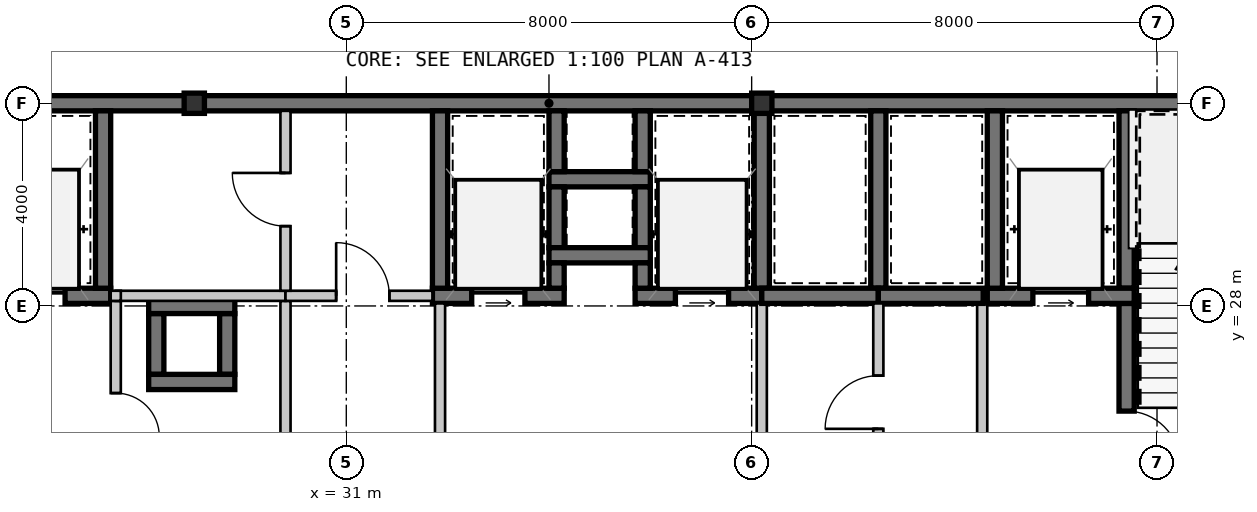
"""IFC4 building model, lengths in metres.
Left out: names, types, materials, properties, quantities, classifications, styles, units other than length and angle.
Written with IfcOpenShell. Run it as: python <this file> out.ifc"""

import sys

from ifc_helpers import new_model, si_unit, direction, frame, frame_2d, origin, origin_2d, place, context, subcontext, project, spatial, rectangle, hollow_rectangle, extrude, source, transform, mapped, element, fill, save


model = new_model("IFC4")
c1 = context("Model", 3, precision=1e-05, world=origin(), true_north=direction((0.0, 1.0)))
c2 = subcontext(c1, "Body", "Model", "MODEL_VIEW")
j1 = project(units=[si_unit("LENGTHUNIT", "METRE"), si_unit("PLANEANGLEUNIT", "RADIAN")], contexts=[c1])
p1 = place(None, origin())
s1 = spatial("IfcSite", under=j1, at=p1, CompositionType="ELEMENT")
p2 = place(p1, origin())
s2 = spatial("IfcBuilding", under=s1, at=p2, CompositionType="ELEMENT")
p3 = place(p2, frame((0.0, 0.0, 158.2)))
s3 = spatial("IfcBuildingStorey", under=s2, at=p3, CompositionType="ELEMENT", Elevation=158.2)
m1 = source(origin(), c2, "Body", "SweptSolid", [
    extrude(hollow_rectangle(XDim=0.4, YDim=0.4, WallThickness=0.016, at=origin_2d()), origin(), (0.0, 0.0, 1.0), 3.15),
])
for number, where, z_axis, x_axis in (
    (1, (28.0, 32.0, 0.0), (0.0, 0.0, 1.0), (1.0, 0.0, 0.0)),
    (2, (39.2, 32.0, 0.0), (0.0, 0.0, 1.0), (1.0, 0.0, 0.0)),
):
    element("IfcColumn", number, at=place(p3, frame(where, z_axis=z_axis, x_axis=x_axis)), inside=s3, PredefinedType="COLUMN", context=c2, shape_type="MappedRepresentation", body=[
        mapped(m1, transform((0.0, 0.0, 0.0), scale=1.0)),
    ])
m2 = source(origin(), c2, "Body", "SweptSolid", [
    extrude(rectangle(XDim=9.15, YDim=0.3, at=frame_2d((4.575, 0.0))), origin(), (0.0, 0.0, 1.0), 2.93),
])
p4 = place(p3, frame((18.85, 32.0, 0.0), z_axis=(0.0, 0.0, 1.0), x_axis=(1.0, 0.0, 0.0)))
e3 = element("IfcWall", 3, at=p4, inside=s3, PredefinedType="SHEAR", context=c2, shape_type="MappedRepresentation", body=[
    mapped(m2, transform((0.0, 0.0, 0.0), scale=1.0)),
])
m3 = source(origin(), c2, "Body", "SweptSolid", [
    extrude(rectangle(XDim=11.2, YDim=0.3, at=frame_2d((5.6, 0.0))), origin(), (0.0, 0.0, 1.0), 2.93),
])
p5 = place(p3, frame((28.0, 32.0, 0.0), z_axis=(0.0, 0.0, 1.0), x_axis=(1.0, 0.0, 0.0)))
e4 = element("IfcWall", 4, at=p5, inside=s3, PredefinedType="SHEAR", context=c2, shape_type="MappedRepresentation", body=[
    mapped(m3, transform((0.0, 0.0, 0.0), scale=1.0)),
])
m4 = source(origin(), c2, "Body", "SweptSolid", [
    extrude(rectangle(XDim=11.95, YDim=0.3, at=frame_2d((5.975, 0.0))), origin(), (0.0, 0.0, 1.0), 2.93),
])
p6 = place(p3, frame((39.2, 32.0, 0.0), z_axis=(0.0, 0.0, 1.0), x_axis=(1.0, 0.0, 0.0)))
e5 = element("IfcWall", 5, at=p6, inside=s3, PredefinedType="SHEAR", context=c2, shape_type="MappedRepresentation", body=[
    mapped(m4, transform((0.0, 0.0, 0.0), scale=1.0)),
])
m5 = source(origin(), c2, "Body", "SweptSolid", [
    extrude(rectangle(XDim=2.9, YDim=0.3, at=frame_2d((1.45, 0.0))), origin(), (0.0, 0.0, 1.0), 2.93),
])
p7 = place(p3, frame((23.45, 28.2, 0.0), z_axis=(0.0, 0.0, 1.0), x_axis=(1.0, 0.0, 0.0)))
e6 = element("IfcWall", 6, at=p7, inside=s3, PredefinedType="SHEAR", context=c2, shape_type="MappedRepresentation", body=[
    mapped(m5, transform((0.0, 0.0, 0.0), scale=1.0)),
])
m6 = source(origin(), c2, "Body", "SweptSolid", [
    extrude(rectangle(XDim=1.1, YDim=2.15, at=frame_2d((0.55, 1.075))), frame((0.0, 0.16, 0.0), z_axis=(0.0, -1.0, 0.0), x_axis=(1.0, 0.0, 0.0)), (0.0, 0.0, 1.0), 0.32),
])
p8 = place(p7, frame((0.9, 0.0, 0.0)))
e7 = element("IfcOpeningElement", 7, at=p8, cuts=e6, PredefinedType="OPENING", context=c2, shape_type="MappedRepresentation", body=[
    mapped(m6, transform((0.0, 0.0, 0.0), scale=1.0)),
])
m7 = source(origin(), c2, "Body", "SweptSolid", [
    extrude(rectangle(XDim=3.5, YDim=0.3, at=frame_2d((1.75, 0.0))), origin(), (0.0, 0.0, 1.0), 2.93),
])
p9 = place(p3, frame((26.2, 28.35, 0.0), z_axis=(0.0, 0.0, 1.0), x_axis=(0.0, 1.0, 0.0)))
e8 = element("IfcWall", 8, at=p9, inside=s3, PredefinedType="SHEAR", context=c2, shape_type="MappedRepresentation", body=[
    mapped(m7, transform((0.0, 0.0, 0.0), scale=1.0)),
])
m8 = source(origin(), c2, "Body", "SweptSolid", [
    extrude(rectangle(XDim=4.0, YDim=0.2, at=frame_2d((2.0, 0.0))), origin(), (0.0, 0.0, 1.0), 2.93),
])
p10 = place(p3, frame((26.45, 24.1, 0.0), z_axis=(0.0, 0.0, 1.0), x_axis=(0.0, 1.0, 0.0)))
e9 = element("IfcWall", 9, at=p10, inside=s3, PredefinedType="SOLIDWALL", context=c2, shape_type="MappedRepresentation", body=[
    mapped(m8, transform((0.0, 0.0, 0.0), scale=1.0)),
])
m9 = source(origin(), c2, "Body", "SweptSolid", [
    extrude(rectangle(XDim=0.86, YDim=2.1, at=frame_2d((0.43, 1.05))), frame((0.0, 0.11, 0.0), z_axis=(0.0, -1.0, 0.0), x_axis=(1.0, 0.0, 0.0)), (0.0, 0.0, 1.0), 0.22),
])
p11 = place(p10, frame((1.32, 0.0, 0.0)))
e10 = element("IfcOpeningElement", 10, at=p11, cuts=e9, PredefinedType="OPENING", context=c2, shape_type="MappedRepresentation", body=[
    mapped(m9, transform((0.0, 0.0, 0.0), scale=1.0)),
])
p12 = place(p3, frame((46.4, 31.85, 0.0), z_axis=(0.0, 0.0, 1.0), x_axis=(0.0, -1.0, 0.0)))
e11 = element("IfcWall", 11, at=p12, inside=s3, PredefinedType="SHEAR", context=c2, shape_type="MappedRepresentation", body=[
    mapped(m7, transform((0.0, 0.0, 0.0), scale=1.0)),
])
m10 = source(origin(), c2, "Body", "SweptSolid", [
    extrude(rectangle(XDim=3.9, YDim=0.3, at=frame_2d((1.95, 0.0))), origin(), (0.0, 0.0, 1.0), 2.93),
])
p13 = place(p3, frame((46.4, 28.05, 0.0), z_axis=(0.0, 0.0, 1.0), x_axis=(0.0, -1.0, 0.0)))
e12 = element("IfcWall", 12, at=p13, inside=s3, PredefinedType="SHEAR", context=c2, shape_type="MappedRepresentation", body=[
    mapped(m10, transform((0.0, 0.0, 0.0), scale=1.0)),
])
m11 = source(origin(), c2, "Body", "SweptSolid", [
    extrude(rectangle(XDim=1.05, YDim=2.1, at=frame_2d((0.525, 1.05))), frame((0.0, 0.16, 0.0), z_axis=(0.0, -1.0, 0.0), x_axis=(1.0, 0.0, 0.0)), (0.0, 0.0, 1.0), 0.32),
])
p14 = place(p13, frame((2.125, 0.0, 0.0)))
e13 = element("IfcOpeningElement", 13, at=p14, cuts=e12, PredefinedType="OPENING", context=c2, shape_type="MappedRepresentation", body=[
    mapped(m11, transform((0.0, 0.0, 0.0), scale=1.0)),
])
p15 = place(p3, frame((43.65, 28.2, 0.0), z_axis=(0.0, 0.0, 1.0), x_axis=(1.0, 0.0, 0.0)))
e14 = element("IfcWall", 14, at=p15, inside=s3, PredefinedType="SHEAR", context=c2, shape_type="MappedRepresentation", body=[
    mapped(m5, transform((0.0, 0.0, 0.0), scale=1.0)),
])
p16 = place(p15, frame((0.9, 0.0, 0.0)))
e15 = element("IfcOpeningElement", 15, at=p16, cuts=e14, PredefinedType="OPENING", context=c2, shape_type="MappedRepresentation", body=[
    mapped(m6, transform((0.0, 0.0, 0.0), scale=1.0)),
])
p17 = place(p3, frame((43.8, 31.85, 0.0), z_axis=(0.0, 0.0, 1.0), x_axis=(0.0, -1.0, 0.0)))
e16 = element("IfcWall", 16, at=p17, inside=s3, PredefinedType="SHEAR", context=c2, shape_type="MappedRepresentation", body=[
    mapped(m7, transform((0.0, 0.0, 0.0), scale=1.0)),
])
m12 = source(origin(), c2, "Body", "SweptSolid", [
    extrude(rectangle(XDim=3.95, YDim=0.2, at=frame_2d((1.975, 0.0))), origin(), (0.0, 0.0, 1.0), 2.93),
])
p18 = place(p3, frame((43.55, 28.05, 0.0), z_axis=(0.0, 0.0, 1.0), x_axis=(0.0, -1.0, 0.0)))
e17 = element("IfcWall", 17, at=p18, inside=s3, PredefinedType="SOLIDWALL", context=c2, shape_type="MappedRepresentation", body=[
    mapped(m12, transform((0.0, 0.0, 0.0), scale=1.0)),
])
m13 = source(origin(), c2, "Body", "SweptSolid", [
    extrude(rectangle(XDim=2.0, YDim=0.3, at=frame_2d((1.0, 0.0))), origin(), (0.0, 0.0, 1.0), 2.93),
])
p19 = place(p3, frame((35.0, 30.5, 0.0), z_axis=(0.0, 0.0, 1.0), x_axis=(1.0, 0.0, 0.0)))
e18 = element("IfcWall", 18, at=p19, inside=s3, PredefinedType="SHEAR", context=c2, shape_type="MappedRepresentation", body=[
    mapped(m13, transform((0.0, 0.0, 0.0), scale=1.0)),
])
m14 = source(origin(), c2, "Body", "SweptSolid", [
    extrude(rectangle(XDim=1.2, YDim=0.3, at=frame_2d((0.6, 0.0))), origin(), (0.0, 0.0, 1.0), 2.93),
])
for number, where, z_axis, x_axis in (
    (19, (35.15, 31.85, 0.0), (0.0, 0.0, 1.0), (0.0, -1.0, 0.0)),
    (20, (36.85, 30.65, 0.0), (0.0, 0.0, 1.0), (0.0, 1.0, 0.0)),
    (21, (35.15, 30.35, 0.0), (0.0, 0.0, 1.0), (0.0, -1.0, 0.0)),
    (22, (36.85, 29.15, 0.0), (0.0, 0.0, 1.0), (0.0, 1.0, 0.0)),
):
    element("IfcWall", number, at=place(p3, frame(where, z_axis=z_axis, x_axis=x_axis)), inside=s3, PredefinedType="SHEAR", context=c2, shape_type="MappedRepresentation", body=[
        mapped(m14, transform((0.0, 0.0, 0.0), scale=1.0)),
    ])
p20 = place(p3, frame((35.0, 29.0, 0.0), z_axis=(0.0, 0.0, 1.0), x_axis=(1.0, 0.0, 0.0)))
e23 = element("IfcWall", 23, at=p20, inside=s3, PredefinedType="SHEAR", context=c2, shape_type="MappedRepresentation", body=[
    mapped(m13, transform((0.0, 0.0, 0.0), scale=1.0)),
])
for number, where, z_axis, x_axis in (
    (24, (28.65, 26.65, 0.0), (0.0, 0.0, 1.0), (0.0, 1.0, 0.0)),
    (25, (27.25, 27.85, 0.0), (0.0, 0.0, 1.0), (0.0, -1.0, 0.0)),
):
    element("IfcWall", number, at=place(p3, frame(where, z_axis=z_axis, x_axis=x_axis)), inside=s3, PredefinedType="SHEAR", context=c2, shape_type="MappedRepresentation", body=[
        mapped(m14, transform((0.0, 0.0, 0.0), scale=1.0)),
    ])
m15 = source(origin(), c2, "Body", "SweptSolid", [
    extrude(rectangle(XDim=1.7, YDim=0.3, at=frame_2d((0.85, 0.0))), origin(), (0.0, 0.0, 1.0), 2.93),
])
for number, where, z_axis, x_axis in (
    (26, (28.8, 28.0, 0.0), (0.0, 0.0, 1.0), (-1.0, 0.0, 0.0)),
    (27, (27.1, 26.5, 0.0), (0.0, 0.0, 1.0), (1.0, 0.0, 0.0)),
):
    element("IfcWall", number, at=place(p3, frame(where, z_axis=z_axis, x_axis=x_axis)), inside=s3, PredefinedType="SHEAR", context=c2, shape_type="MappedRepresentation", body=[
        mapped(m15, transform((0.0, 0.0, 0.0), scale=1.0)),
    ])
m16 = source(origin(), c2, "Body", "SweptSolid", [
    extrude(rectangle(XDim=2.6, YDim=0.3, at=frame_2d((1.3, 0.0))), origin(), (0.0, 0.0, 1.0), 2.93),
])
p21 = place(p3, frame((32.7, 28.2, 0.0), z_axis=(0.0, 0.0, 1.0), x_axis=(1.0, 0.0, 0.0)))
e28 = element("IfcWall", 28, at=p21, inside=s3, PredefinedType="SHEAR", context=c2, shape_type="MappedRepresentation", body=[
    mapped(m16, transform((0.0, 0.0, 0.0), scale=1.0)),
])
m17 = source(origin(), c2, "Body", "SweptSolid", [
    extrude(rectangle(XDim=1.05, YDim=2.15, at=frame_2d((0.525, 1.075))), frame((0.0, 0.16, 0.0), z_axis=(0.0, -1.0, 0.0), x_axis=(1.0, 0.0, 0.0)), (0.0, 0.0, 1.0), 0.32),
])
p22 = place(p21, frame((0.775, 0.0, 0.0)))
e29 = element("IfcOpeningElement", 29, at=p22, cuts=e28, PredefinedType="OPENING", context=c2, shape_type="MappedRepresentation", body=[
    mapped(m17, transform((0.0, 0.0, 0.0), scale=1.0)),
])
m18 = source(origin(), c2, "Body", "SweptSolid", [
    extrude(rectangle(XDim=0.5, YDim=0.3, at=frame_2d((0.25, 0.0))), origin(), (0.0, 0.0, 1.0), 2.93),
])
p23 = place(p3, frame((35.15, 28.35, 0.0), z_axis=(0.0, 0.0, 1.0), x_axis=(0.0, 1.0, 0.0)))
e30 = element("IfcWall", 30, at=p23, inside=s3, PredefinedType="SHEAR", context=c2, shape_type="MappedRepresentation", body=[
    mapped(m18, transform((0.0, 0.0, 0.0), scale=1.0)),
])
p24 = place(p3, frame((32.85, 31.85, 0.0), z_axis=(0.0, 0.0, 1.0), x_axis=(0.0, -1.0, 0.0)))
e31 = element("IfcWall", 31, at=p24, inside=s3, PredefinedType="SHEAR", context=c2, shape_type="MappedRepresentation", body=[
    mapped(m7, transform((0.0, 0.0, 0.0), scale=1.0)),
])
m19 = source(origin(), c2, "Body", "SweptSolid", [
    extrude(rectangle(XDim=2.5, YDim=0.3, at=frame_2d((1.25, 0.0))), origin(), (0.0, 0.0, 1.0), 2.93),
])
p25 = place(p3, frame((36.7, 28.2, 0.0), z_axis=(0.0, 0.0, 1.0), x_axis=(1.0, 0.0, 0.0)))
e32 = element("IfcWall", 32, at=p25, inside=s3, PredefinedType="SHEAR", context=c2, shape_type="MappedRepresentation", body=[
    mapped(m19, transform((0.0, 0.0, 0.0), scale=1.0)),
])
p26 = place(p25, frame((0.795, 0.0, 0.0)))
e33 = element("IfcOpeningElement", 33, at=p26, cuts=e32, PredefinedType="OPENING", context=c2, shape_type="MappedRepresentation", body=[
    mapped(m17, transform((0.0, 0.0, 0.0), scale=1.0)),
])
p27 = place(p3, frame((36.85, 28.85, 0.0), z_axis=(0.0, 0.0, 1.0), x_axis=(0.0, -1.0, 0.0)))
e34 = element("IfcWall", 34, at=p27, inside=s3, PredefinedType="SHEAR", context=c2, shape_type="MappedRepresentation", body=[
    mapped(m18, transform((0.0, 0.0, 0.0), scale=1.0)),
])
p28 = place(p3, frame((39.2, 28.35, 0.0), z_axis=(0.0, 0.0, 1.0), x_axis=(0.0, 1.0, 0.0)))
e35 = element("IfcWall", 35, at=p28, inside=s3, PredefinedType="SHEAR", context=c2, shape_type="MappedRepresentation", body=[
    mapped(m7, transform((0.0, 0.0, 0.0), scale=1.0)),
])
p29 = place(p3, frame((32.85, 24.1, 0.0), z_axis=(0.0, 0.0, 1.0), x_axis=(0.0, 1.0, 0.0)))
e36 = element("IfcWall", 36, at=p29, inside=s3, PredefinedType="SOLIDWALL", context=c2, shape_type="MappedRepresentation", body=[
    mapped(m12, transform((0.0, 0.0, 0.0), scale=1.0)),
])
m20 = source(origin(), c2, "Body", "SweptSolid", [
    extrude(rectangle(XDim=3.95, YDim=0.2, at=frame_2d((1.975, 0.0))), origin(), (0.0, 0.0, 1.0), 2.47),
])
p30 = place(p3, frame((39.2, 28.05, 0.0), z_axis=(0.0, 0.0, 1.0), x_axis=(0.0, -1.0, 0.0)))
e37 = element("IfcWall", 37, at=p30, inside=s3, PredefinedType="SOLIDWALL", context=c2, shape_type="MappedRepresentation", body=[
    mapped(m20, transform((0.0, 0.0, 0.0), scale=1.0)),
])
p31 = place(p3, frame((41.5, 28.35, 0.0), z_axis=(0.0, 0.0, 1.0), x_axis=(0.0, 1.0, 0.0)))
e38 = element("IfcWall", 38, at=p31, inside=s3, PredefinedType="SHEAR", context=c2, shape_type="MappedRepresentation", body=[
    mapped(m7, transform((0.0, 0.0, 0.0), scale=1.0)),
])
m21 = source(origin(), c2, "Body", "SweptSolid", [
    extrude(rectangle(XDim=2.3, YDim=0.3, at=frame_2d((1.15, 0.0))), origin(), (0.0, 0.0, 1.0), 2.93),
])
p32 = place(p3, frame((39.2, 28.2, 0.0), z_axis=(0.0, 0.0, 1.0), x_axis=(1.0, 0.0, 0.0)))
e39 = element("IfcWall", 39, at=p32, inside=s3, PredefinedType="SHEAR", context=c2, shape_type="MappedRepresentation", body=[
    mapped(m21, transform((0.0, 0.0, 0.0), scale=1.0)),
])
m22 = source(origin(), c2, "Body", "SweptSolid", [
    extrude(rectangle(XDim=2.07, YDim=0.3, at=frame_2d((1.035, 0.0))), origin(), (0.0, 0.0, 1.0), 2.93),
])
p33 = place(p3, frame((41.5, 28.2, 0.0), z_axis=(0.0, 0.0, 1.0), x_axis=(1.0, 0.0, 0.0)))
e40 = element("IfcWall", 40, at=p33, inside=s3, PredefinedType="SHEAR", context=c2, shape_type="MappedRepresentation", body=[
    mapped(m22, transform((0.0, 0.0, 0.0), scale=1.0)),
])
p34 = place(p3, frame((29.8, 28.1, 0.0), z_axis=(0.0, 0.0, 1.0), x_axis=(0.0, -1.0, 0.0)))
e41 = element("IfcWall", 41, at=p34, inside=s3, PredefinedType="SOLIDWALL", context=c2, shape_type="MappedRepresentation", body=[
    mapped(m8, transform((0.0, 0.0, 0.0), scale=1.0)),
])
m23 = source(origin(), c2, "Body", "SweptSolid", [
    extrude(rectangle(XDim=3.35, YDim=0.2, at=frame_2d((1.675, 0.0))), origin(), (0.0, 0.0, 1.0), 2.93),
])
p35 = place(p3, frame((26.45, 28.2, 0.0), z_axis=(0.0, 0.0, 1.0), x_axis=(1.0, 0.0, 0.0)))
e42 = element("IfcWall", 42, at=p35, inside=s3, PredefinedType="SOLIDWALL", context=c2, shape_type="MappedRepresentation", body=[
    mapped(m23, transform((0.0, 0.0, 0.0), scale=1.0)),
])
m24 = source(origin(), c2, "Body", "SweptSolid", [
    extrude(rectangle(XDim=2.9, YDim=0.2, at=frame_2d((1.45, 0.0))), origin(), (0.0, 0.0, 1.0), 2.93),
])
p36 = place(p3, frame((29.8, 28.2, 0.0), z_axis=(0.0, 0.0, 1.0), x_axis=(1.0, 0.0, 0.0)))
e43 = element("IfcWall", 43, at=p36, inside=s3, PredefinedType="SOLIDWALL", context=c2, shape_type="MappedRepresentation", body=[
    mapped(m24, transform((0.0, 0.0, 0.0), scale=1.0)),
])
m25 = source(origin(), c2, "Body", "SweptSolid", [
    extrude(rectangle(XDim=1.05, YDim=2.1, at=frame_2d((0.525, 1.05))), frame((0.0, 0.11, 0.0), z_axis=(0.0, -1.0, 0.0), x_axis=(1.0, 0.0, 0.0)), (0.0, 0.0, 1.0), 0.22),
])
p37 = place(p36, frame((1.0, 0.0, 0.0)))
e44 = element("IfcOpeningElement", 44, at=p37, cuts=e43, PredefinedType="OPENING", context=c2, shape_type="MappedRepresentation", body=[
    mapped(m25, transform((0.0, 0.0, 0.0), scale=1.0)),
])
m26 = source(origin(), c2, "Body", "SweptSolid", [
    extrude(rectangle(XDim=3.55, YDim=0.2, at=frame_2d((1.775, 0.0))), origin(), (0.0, 0.0, 1.0), 2.93),
])
p38 = place(p3, frame((29.8, 31.85, 0.0), z_axis=(0.0, 0.0, 1.0), x_axis=(0.0, -1.0, 0.0)))
e45 = element("IfcWall", 45, at=p38, inside=s3, PredefinedType="SOLIDWALL", context=c2, shape_type="MappedRepresentation", body=[
    mapped(m26, transform((0.0, 0.0, 0.0), scale=1.0)),
])
p39 = place(p38, frame((1.225, 0.0, 0.0)))
e46 = element("IfcOpeningElement", 46, at=p39, cuts=e45, PredefinedType="OPENING", context=c2, shape_type="MappedRepresentation", body=[
    mapped(m25, transform((0.0, 0.0, 0.0), scale=1.0)),
])
p40 = place(p3, frame((41.5, 28.05, 0.0), z_axis=(0.0, 0.0, 1.0), x_axis=(0.0, -1.0, 0.0)))
e47 = element("IfcWall", 47, at=p40, inside=s3, PredefinedType="SOLIDWALL", context=c2, shape_type="MappedRepresentation", body=[
    mapped(m12, transform((0.0, 0.0, 0.0), scale=1.0)),
])
p41 = place(p40, frame((1.425, 0.0, 0.0)))
e48 = element("IfcOpeningElement", 48, at=p41, cuts=e47, PredefinedType="OPENING", context=c2, shape_type="MappedRepresentation", body=[
    mapped(m25, transform((0.0, 0.0, 0.0), scale=1.0)),
])
m27 = source(origin(), c2, "Body", "SweptSolid", [
    extrude(rectangle(XDim=0.2, YDim=0.2, at=frame_2d((0.1, 0.0))), origin(), (0.0, 0.0, 1.0), 2.93),
])
p42 = place(p3, frame((26.35, 28.2, 0.0), z_axis=(0.0, 0.0, 1.0), x_axis=(1.0, 0.0, 0.0)))
e49 = element("IfcWall", 49, at=p42, inside=s3, PredefinedType="SOLIDWALL", context=c2, shape_type="MappedRepresentation", body=[
    mapped(m27, transform((0.0, 0.0, 0.0), scale=1.0)),
])
m28 = source(origin(), c2, "Body", "SweptSolid", [
    extrude(rectangle(XDim=1.1, YDim=2.15, at=frame_2d((0.55, 1.075))), frame((0.0, 0.025, 0.0), z_axis=(0.0, -1.0, 0.0), x_axis=(1.0, 0.0, 0.0)), (0.0, 0.0, 1.0), 0.05),
])
p43 = place(p8, origin())
e50 = element("IfcDoor", 50, at=p43, inside=s3, OperationType="SLIDING_TO_LEFT", PredefinedType="DOOR", context=c2, shape_type="MappedRepresentation", body=[
    mapped(m28, transform((0.0, 0.0, 0.0), scale=1.0)),
])
fill(e7, e50)
m29 = source(origin(), c2, "Body", "SweptSolid", [
    extrude(rectangle(XDim=1.05, YDim=2.1, at=frame_2d((0.525, 1.05))), frame((0.0, 0.025, 0.0), z_axis=(0.0, -1.0, 0.0), x_axis=(1.0, 0.0, 0.0)), (0.0, 0.0, 1.0), 0.05),
])
p44 = place(p14, origin())
e51 = element("IfcDoor", 51, at=p44, inside=s3, OperationType="SINGLE_SWING_RIGHT", PredefinedType="DOOR", context=c2, shape_type="MappedRepresentation", body=[
    mapped(m29, transform((0.0, 0.0, 0.0), scale=1.0)),
])
fill(e13, e51)
p45 = place(p16, origin())
e52 = element("IfcDoor", 52, at=p45, inside=s3, OperationType="SLIDING_TO_LEFT", PredefinedType="DOOR", context=c2, shape_type="MappedRepresentation", body=[
    mapped(m28, transform((0.0, 0.0, 0.0), scale=1.0)),
])
fill(e15, e52)
m30 = source(origin(), c2, "Body", "SweptSolid", [
    extrude(rectangle(XDim=1.05, YDim=2.15, at=frame_2d((0.525, 1.075))), frame((0.0, 0.025, 0.0), z_axis=(0.0, -1.0, 0.0), x_axis=(1.0, 0.0, 0.0)), (0.0, 0.0, 1.0), 0.05),
])
p46 = place(p22, origin())
e53 = element("IfcDoor", 53, at=p46, inside=s3, OperationType="SLIDING_TO_LEFT", PredefinedType="DOOR", context=c2, shape_type="MappedRepresentation", body=[
    mapped(m30, transform((0.0, 0.0, 0.0), scale=1.0)),
])
fill(e29, e53)
p47 = place(p26, origin())
e54 = element("IfcDoor", 54, at=p47, inside=s3, OperationType="SLIDING_TO_LEFT", PredefinedType="DOOR", context=c2, shape_type="MappedRepresentation", body=[
    mapped(m30, transform((0.0, 0.0, 0.0), scale=1.0)),
])
fill(e33, e54)
p48 = place(p37, origin())
e55 = element("IfcDoor", 55, at=p48, inside=s3, OperationType="SINGLE_SWING_LEFT", PredefinedType="DOOR", context=c2, shape_type="MappedRepresentation", body=[
    mapped(m29, transform((0.0, 0.0, 0.0), scale=1.0)),
])
fill(e44, e55)
p49 = place(p39, frame((1.05, 0.0, 0.0), z_axis=(0.0, 0.0, 1.0), x_axis=(-1.0, 0.0, 0.0)))
e56 = element("IfcDoor", 56, at=p49, inside=s3, OperationType="SINGLE_SWING_RIGHT", PredefinedType="DOOR", context=c2, shape_type="MappedRepresentation", body=[
    mapped(m29, transform((0.0, 0.0, 0.0), scale=1.0)),
])
fill(e46, e56)
p50 = place(p41, frame((1.05, 0.0, 0.0), z_axis=(0.0, 0.0, 1.0), x_axis=(-1.0, 0.0, 0.0)))
e57 = element("IfcDoor", 57, at=p50, inside=s3, OperationType="SINGLE_SWING_LEFT", PredefinedType="DOOR", context=c2, shape_type="MappedRepresentation", body=[
    mapped(m29, transform((0.0, 0.0, 0.0), scale=1.0)),
])
fill(e48, e57)
m31 = source(origin(), c2, "Body", "SweptSolid", [
    extrude(rectangle(XDim=0.86, YDim=2.1, at=frame_2d((0.43, 1.05))), frame((0.0, 0.025, 0.0), z_axis=(0.0, -1.0, 0.0), x_axis=(1.0, 0.0, 0.0)), (0.0, 0.0, 1.0), 0.05),
])
p51 = place(p11, frame((0.86, 0.0, 0.0), z_axis=(0.0, 0.0, 1.0), x_axis=(-1.0, 0.0, 0.0)))
e58 = element("IfcDoor", 58, at=p51, inside=s3, OperationType="SINGLE_SWING_RIGHT", PredefinedType="DOOR", context=c2, shape_type="MappedRepresentation", body=[
    mapped(m31, transform((0.0, 0.0, 0.0), scale=1.0)),
])
fill(e10, e58)
save(model, sys.argv[1])
